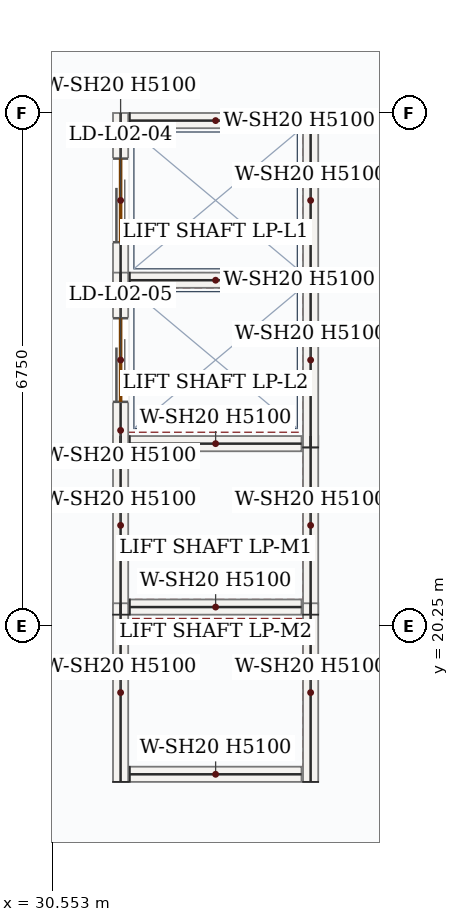
"""IFC4 building model, lengths in metres.
Left out: names, types, materials, properties, quantities, classifications, styles, units other than length and angle.
Written with IfcOpenShell. Run it as: python <this file> out.ifc"""

import sys

from ifc_helpers import new_model, si_unit, direction, frame, frame_2d, origin, place, context, subcontext, project, spatial, rectangle, extrude, source, transform, mapped, element, fill, save


model = new_model("IFC4")
c1 = context("Model", 3, precision=1e-05, world=origin(), true_north=direction((0.0, 1.0)))
c2 = subcontext(c1, "Body", "Model", "MODEL_VIEW")
j1 = project(units=[si_unit("LENGTHUNIT", "METRE"), si_unit("PLANEANGLEUNIT", "RADIAN")], contexts=[c1])
p1 = place(None, origin())
s1 = spatial("IfcSite", under=j1, at=p1, CompositionType="ELEMENT")
p2 = place(p1, origin())
s2 = spatial("IfcBuilding", under=s1, at=p2, CompositionType="ELEMENT")
p3 = place(p2, frame((0.0, 0.0, 12.6)))
s3 = spatial("IfcBuildingStorey", under=s2, at=p3, CompositionType="ELEMENT", Elevation=12.6)
m1 = source(origin(), c2, "Body", "SweptSolid", [
    extrude(rectangle(XDim=2.35, YDim=0.2, at=frame_2d((1.175, 0.0))), origin(), (0.0, 0.0, 1.0), 5.1),
])
for number, where, z_axis, x_axis in (
    (1, (31.45, 20.4, 0.0), (0.0, 0.0, 1.0), (0.0, 1.0, 0.0)),
    (2, (33.95, 20.4, 0.0), (0.0, 0.0, 1.0), (0.0, 1.0, 0.0)),
):
    element("IfcWall", number, at=place(p3, frame(where, z_axis=z_axis, x_axis=x_axis)), inside=s3, PredefinedType="SOLIDWALL", context=c2, shape_type="MappedRepresentation", body=[
        mapped(m1, transform((0.0, 0.0, 0.0), x_axis=(1.0, 0.0, 0.0), y_axis=(0.0, 1.0, 0.0), z_axis=(0.0, 0.0, 1.0), scale=1.0)),
    ])
m2 = source(origin(), c2, "Body", "SweptSolid", [
    extrude(rectangle(XDim=2.26, YDim=0.2, at=frame_2d((1.13, 0.0))), origin(), (0.0, 0.0, 1.0), 5.1),
])
for number, where, z_axis, x_axis in (
    (3, (31.57, 20.5, 0.0), (0.0, 0.0, 1.0), (1.0, 0.0, 0.0)),
    (4, (31.57, 22.65, 0.0), (0.0, 0.0, 1.0), (1.0, 0.0, 0.0)),
):
    element("IfcWall", number, at=place(p3, frame(where, z_axis=z_axis, x_axis=x_axis)), inside=s3, PredefinedType="SOLIDWALL", context=c2, shape_type="MappedRepresentation", body=[
        mapped(m2, transform((0.0, 0.0, 0.0), x_axis=(1.0, 0.0, 0.0), y_axis=(0.0, 1.0, 0.0), z_axis=(0.0, 0.0, 1.0), scale=1.0)),
    ])
for number, where, z_axis, x_axis in (
    (5, (31.45, 18.2, 0.0), (0.0, 0.0, 1.0), (0.0, 1.0, 0.0)),
    (6, (33.95, 18.2, 0.0), (0.0, 0.0, 1.0), (0.0, 1.0, 0.0)),
):
    element("IfcWall", number, at=place(p3, frame(where, z_axis=z_axis, x_axis=x_axis)), inside=s3, PredefinedType="SOLIDWALL", context=c2, shape_type="MappedRepresentation", body=[
        mapped(m1, transform((0.0, 0.0, 0.0), x_axis=(1.0, 0.0, 0.0), y_axis=(0.0, 1.0, 0.0), z_axis=(0.0, 0.0, 1.0), scale=1.0)),
    ])
p4 = place(p3, frame((31.57, 18.3, 0.0), z_axis=(0.0, 0.0, 1.0), x_axis=(1.0, 0.0, 0.0)))
e7 = element("IfcWall", 7, at=p4, inside=s3, PredefinedType="SOLIDWALL", context=c2, shape_type="MappedRepresentation", body=[
    mapped(m2, transform((0.0, 0.0, 0.0), x_axis=(1.0, 0.0, 0.0), y_axis=(0.0, 1.0, 0.0), z_axis=(0.0, 0.0, 1.0), scale=1.0)),
])
p5 = place(p3, frame((31.45, 24.7, 0.0), z_axis=(0.0, 0.0, 1.0), x_axis=(0.0, 1.0, 0.0)))
e8 = element("IfcWall", 8, at=p5, inside=s3, PredefinedType="SOLIDWALL", context=c2, shape_type="SweptSolid", body=[
    extrude(rectangle(XDim=2.3, YDim=0.2, at=frame_2d((1.15, 0.0))), origin(), (0.0, 0.0, 1.0), 5.1),
])
p6 = place(p5, frame((0.6, 0.0, 0.0)))
e9 = element("IfcOpeningElement", 9, at=p6, cuts=e8, PredefinedType="OPENING", context=c2, shape_type="SweptSolid", body=[
    extrude(rectangle(XDim=1.1, YDim=2.15, at=frame_2d((0.55, 1.075))), frame((0.0, 0.11, 0.0), z_axis=(0.0, -1.0, 0.0), x_axis=(1.0, 0.0, 0.0)), (0.0, 0.0, 1.0), 0.22),
])
m3 = source(origin(), c2, "Body", "SweptSolid", [
    extrude(rectangle(XDim=2.3, YDim=0.2, at=frame_2d((1.15, 0.0))), origin(), (0.0, 0.0, 1.0), 5.1),
])
p7 = place(p3, frame((33.95, 24.7, 0.0), z_axis=(0.0, 0.0, 1.0), x_axis=(0.0, 1.0, 0.0)))
e10 = element("IfcWall", 10, at=p7, inside=s3, PredefinedType="SOLIDWALL", context=c2, shape_type="MappedRepresentation", body=[
    mapped(m3, transform((0.0, 0.0, 0.0), x_axis=(1.0, 0.0, 0.0), y_axis=(0.0, 1.0, 0.0), z_axis=(0.0, 0.0, 1.0), scale=1.0)),
])
for number, where, z_axis, x_axis in (
    (11, (31.57, 24.8, 0.0), (0.0, 0.0, 1.0), (1.0, 0.0, 0.0)),
    (12, (31.57, 26.9, 0.0), (0.0, 0.0, 1.0), (1.0, 0.0, 0.0)),
):
    element("IfcWall", number, at=place(p3, frame(where, z_axis=z_axis, x_axis=x_axis)), inside=s3, PredefinedType="SOLIDWALL", context=c2, shape_type="MappedRepresentation", body=[
        mapped(m2, transform((0.0, 0.0, 0.0), x_axis=(1.0, 0.0, 0.0), y_axis=(0.0, 1.0, 0.0), z_axis=(0.0, 0.0, 1.0), scale=1.0)),
    ])
p8 = place(p3, frame((31.45, 22.6, 0.0), z_axis=(0.0, 0.0, 1.0), x_axis=(0.0, 1.0, 0.0)))
e13 = element("IfcWall", 13, at=p8, inside=s3, PredefinedType="SOLIDWALL", context=c2, shape_type="SweptSolid", body=[
    extrude(rectangle(XDim=2.3, YDim=0.2, at=frame_2d((1.15, 0.0))), origin(), (0.0, 0.0, 1.0), 5.1),
])
p9 = place(p8, frame((0.6, 0.0, 0.0)))
e14 = element("IfcOpeningElement", 14, at=p9, cuts=e13, PredefinedType="OPENING", context=c2, shape_type="SweptSolid", body=[
    extrude(rectangle(XDim=1.1, YDim=2.15, at=frame_2d((0.55, 1.075))), frame((0.0, 0.11, 0.0), z_axis=(0.0, -1.0, 0.0), x_axis=(1.0, 0.0, 0.0)), (0.0, 0.0, 1.0), 0.22),
])
m4 = source(origin(), c2, "Body", "SweptSolid", [
    extrude(rectangle(XDim=2.3, YDim=0.2, at=frame_2d((1.15, 0.0))), origin(), (0.0, 0.0, 1.0), 5.1),
])
p10 = place(p3, frame((33.95, 22.6, 0.0), z_axis=(0.0, 0.0, 1.0), x_axis=(0.0, 1.0, 0.0)))
e15 = element("IfcWall", 15, at=p10, inside=s3, PredefinedType="SOLIDWALL", context=c2, shape_type="MappedRepresentation", body=[
    mapped(m4, transform((0.0, 0.0, 0.0), x_axis=(1.0, 0.0, 0.0), y_axis=(0.0, 1.0, 0.0), z_axis=(0.0, 0.0, 1.0), scale=1.0)),
])
m5 = source(origin(), c2, "Body", "SweptSolid", [
    extrude(rectangle(XDim=1.1, YDim=2.15, at=frame_2d((0.55, 1.075))), frame((0.0, 0.025, 0.0), z_axis=(0.0, -1.0, 0.0), x_axis=(1.0, 0.0, 0.0)), (0.0, 0.0, 1.0), 0.05),
])
p11 = place(p6, origin())
e16 = element("IfcDoor", 16, at=p11, inside=s3, OperationType="DOUBLE_DOOR_SLIDING", PredefinedType="DOOR", context=c2, shape_type="MappedRepresentation", body=[
    mapped(m5, transform((0.0, 0.0, 0.0), x_axis=(1.0, 0.0, 0.0), y_axis=(0.0, 1.0, 0.0), z_axis=(0.0, 0.0, 1.0), scale=1.0)),
])
fill(e9, e16)
p12 = place(p9, origin())
e17 = element("IfcDoor", 17, at=p12, inside=s3, OperationType="DOUBLE_DOOR_SLIDING", PredefinedType="DOOR", context=c2, shape_type="MappedRepresentation", body=[
    mapped(m5, transform((0.0, 0.0, 0.0), x_axis=(1.0, 0.0, 0.0), y_axis=(0.0, 1.0, 0.0), z_axis=(0.0, 0.0, 1.0), scale=1.0)),
])
fill(e14, e17)
save(model, sys.argv[1])
